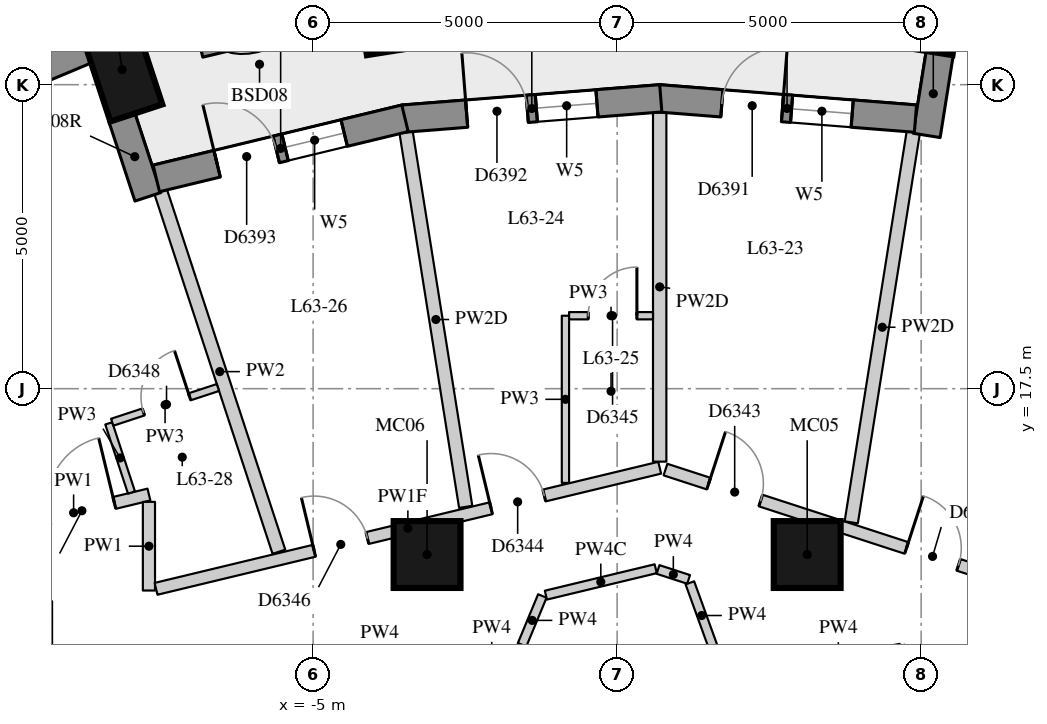
"""IFC4 building model, lengths in metres.
Left out: names, types, materials, properties, quantities, classifications, styles, units other than length and angle.
Written with IfcOpenShell. Run it as: python <this file> out.ifc"""

import sys

from ifc_helpers import new_model, si_unit, direction, frame, frame_2d, origin, origin_2d, place, context, subcontext, project, spatial, rectangle, extrude, element, fill, save


model = new_model("IFC4")
c1 = context("Model", 3, precision=1e-05, world=origin(), true_north=direction((0.0, 1.0)))
c2 = subcontext(c1, "Body", "Model", "MODEL_VIEW")
j1 = project(units=[si_unit("LENGTHUNIT", "METRE"), si_unit("PLANEANGLEUNIT", "RADIAN")], contexts=[c1])
p1 = place(None, origin())
s1 = spatial("IfcSite", under=j1, at=p1, CompositionType="ELEMENT")
p2 = place(p1, origin())
s2 = spatial("IfcBuilding", under=s1, at=p2, CompositionType="ELEMENT")
p3 = place(p2, frame((0.0, 0.0, 222.2)))
s3 = spatial("IfcBuildingStorey", under=s2, at=p3, CompositionType="ELEMENT", Elevation=222.2)
for number, where, z_axis, x_axis in (
    (1, (5.189, 23.797, 0.0), (0.0, 0.0, 1.0), (0.157, 0.988, 0.0)),
    (2, (-3.789, 23.797, 0.0), (0.0, 0.0, 1.0), (-0.157, 0.988, 0.0)),
    (3, (-8.141, 22.748, 0.0), (0.0, 0.0, 1.0), (-0.312, 0.95, 0.0)),
):
    element("IfcColumn", number, at=place(p3, frame(where, z_axis=z_axis, x_axis=x_axis)), inside=s3, PredefinedType="COLUMN", context=c2, shape_type="SweptSolid", body=[
        extrude(rectangle(XDim=1.5, YDim=0.9, at=origin_2d()), origin(), (0.0, 0.0, 1.0), 3.3),
    ])
for number, where, z_axis, x_axis in (
    (4, (3.126, 14.772, 0.0), (0.0, 0.0, 1.0), (1.0, 0.0, 0.0)),
    (5, (-3.126, 14.772, 0.0), (0.0, 0.0, 1.0), (1.0, 0.0, 0.0)),
):
    element("IfcColumn", number, at=place(p3, frame(where, z_axis=z_axis, x_axis=x_axis)), inside=s3, PredefinedType="COLUMN", context=c2, shape_type="SweptSolid", body=[
        extrude(rectangle(XDim=1.1, YDim=1.1, at=origin_2d()), origin(), (0.0, 0.0, 1.0), 3.3),
    ])
p4 = place(p3, frame((-8.703, 23.079, 0.0), z_axis=(0.0, 0.0, 1.0), x_axis=(-0.922168222612, -0.386789050006, 0.0)))
e6 = element("IfcWall", 6, at=p4, inside=s3, PredefinedType="SOLIDWALL", context=c2, shape_type="SweptSolid", body=[
    extrude(rectangle(XDim=3.651, YDim=0.45, at=frame_2d((1.825, 0.0))), origin(), (0.0, 0.0, 1.0), 3.02),
])
p5 = place(p4, frame((0.825, 0.0, 0.4)))
e7 = element("IfcOpeningElement", 7, at=p5, cuts=e6, PredefinedType="OPENING", context=c2, shape_type="SweptSolid", body=[
    extrude(rectangle(XDim=2.0, YDim=1.75, at=frame_2d((1.0, 0.875))), frame((0.0, 0.235, 0.0), z_axis=(0.0, -1.0, 0.0), x_axis=(1.0, 0.0, 0.0)), (0.0, 0.0, 1.0), 0.47),
])
p6 = place(p3, frame((5.309, 23.039, 0.0), z_axis=(0.0, 0.0, 1.0), x_axis=(-0.157189016474, -0.9875685359, 0.0)))
e8 = element("IfcWall", 8, at=p6, inside=s3, PredefinedType="SOLIDWALL", context=c2, shape_type="SweptSolid", body=[
    extrude(rectangle(XDim=1.39, YDim=0.45, at=frame_2d((0.695, 0.0))), origin(), (0.0, 0.0, 1.0), 2.47),
])
p7 = place(p3, frame((-8.15, 21.977, 0.0), z_axis=(0.0, 0.0, 1.0), x_axis=(0.312062715826, -0.950061504005, 0.0)))
e9 = element("IfcWall", 9, at=p7, inside=s3, PredefinedType="SOLIDWALL", context=c2, shape_type="SweptSolid", body=[
    extrude(rectangle(XDim=1.39, YDim=0.45, at=frame_2d((0.695, 0.0))), origin(), (0.0, 0.0, 1.0), 3.02),
])
p8 = place(p3, frame((4.906, 21.942, 0.0), z_axis=(0.0, 0.0, 1.0), x_axis=(-0.996902429846, 0.078648238166, 0.0)))
e10 = element("IfcWall", 10, at=p8, inside=s3, PredefinedType="SOLIDWALL", context=c2, shape_type="SweptSolid", body=[
    extrude(rectangle(XDim=4.237, YDim=0.45, at=frame_2d((2.119, 0.0))), origin(), (0.0, 0.0, 1.0), 3.02),
])
p9 = place(p8, frame((1.044, 0.0, 0.4)))
e11 = element("IfcOpeningElement", 11, at=p9, cuts=e10, PredefinedType="OPENING", context=c2, shape_type="SweptSolid", body=[
    extrude(rectangle(XDim=1.0, YDim=1.75, at=frame_2d((0.5, 0.875))), frame((0.0, 0.235, 0.0), z_axis=(0.0, -1.0, 0.0), x_axis=(1.0, 0.0, 0.0)), (0.0, 0.0, 1.0), 0.47),
])
p10 = place(p8, frame((2.194, 0.0, 0.0)))
e12 = element("IfcOpeningElement", 12, at=p10, cuts=e10, PredefinedType="OPENING", context=c2, shape_type="SweptSolid", body=[
    extrude(rectangle(XDim=1.0, YDim=2.15, at=frame_2d((0.5, 1.075))), frame((0.0, 0.235, 0.0), z_axis=(0.0, -1.0, 0.0), x_axis=(1.0, 0.0, 0.0)), (0.0, 0.0, 1.0), 0.47),
])
p11 = place(p3, frame((0.718, 22.276, 0.0), z_axis=(0.0, 0.0, 1.0), x_axis=(-0.996901346333, -0.078661970983, 0.0)))
e13 = element("IfcWall", 13, at=p11, inside=s3, PredefinedType="SOLIDWALL", context=c2, shape_type="SweptSolid", body=[
    extrude(rectangle(XDim=4.255, YDim=0.45, at=frame_2d((2.127, 0.0))), origin(), (0.0, 0.0, 1.0), 3.02),
])
p12 = place(p11, frame((1.052, 0.0, 0.4)))
e14 = element("IfcOpeningElement", 14, at=p12, cuts=e13, PredefinedType="OPENING", context=c2, shape_type="SweptSolid", body=[
    extrude(rectangle(XDim=1.0, YDim=1.75, at=frame_2d((0.5, 0.875))), frame((0.0, 0.235, 0.0), z_axis=(0.0, -1.0, 0.0), x_axis=(1.0, 0.0, 0.0)), (0.0, 0.0, 1.0), 0.47),
])
p13 = place(p11, frame((2.203, 0.0, 0.0)))
e15 = element("IfcOpeningElement", 15, at=p13, cuts=e13, PredefinedType="OPENING", context=c2, shape_type="SweptSolid", body=[
    extrude(rectangle(XDim=1.0, YDim=2.15, at=frame_2d((0.5, 1.075))), frame((0.0, 0.235, 0.0), z_axis=(0.0, -1.0, 0.0), x_axis=(1.0, 0.0, 0.0)), (0.0, 0.0, 1.0), 0.47),
])
p14 = place(p3, frame((-3.489, 21.947, 0.0), z_axis=(0.0, 0.0, 1.0), x_axis=(-0.972007311035, -0.234950606076, 0.0)))
e16 = element("IfcWall", 16, at=p14, inside=s3, PredefinedType="SOLIDWALL", context=c2, shape_type="SweptSolid", body=[
    extrude(rectangle(XDim=4.207, YDim=0.45, at=frame_2d((2.104, 0.0))), origin(), (0.0, 0.0, 1.0), 3.02),
])
p15 = place(p14, frame((1.029, 0.0, 0.4)))
e17 = element("IfcOpeningElement", 17, at=p15, cuts=e16, PredefinedType="OPENING", context=c2, shape_type="SweptSolid", body=[
    extrude(rectangle(XDim=1.0, YDim=1.75, at=frame_2d((0.5, 0.875))), frame((0.0, 0.235, 0.0), z_axis=(0.0, -1.0, 0.0), x_axis=(1.0, 0.0, 0.0)), (0.0, 0.0, 1.0), 0.47),
])
p16 = place(p14, frame((2.179, 0.0, 0.0)))
e18 = element("IfcOpeningElement", 18, at=p16, cuts=e16, PredefinedType="OPENING", context=c2, shape_type="SweptSolid", body=[
    extrude(rectangle(XDim=1.0, YDim=2.15, at=frame_2d((0.5, 1.075))), frame((0.0, 0.235, 0.0), z_axis=(0.0, -1.0, 0.0), x_axis=(1.0, 0.0, 0.0)), (0.0, 0.0, 1.0), 0.47),
])
p17 = place(p3, frame((-5.146, 23.714, 0.0), z_axis=(0.0, 0.0, 1.0), x_axis=(-0.972142986016, -0.234388597717, 0.0)))
e19 = element("IfcWall", 19, at=p17, inside=s3, PredefinedType="USERDEFINED", context=c2, shape_type="SweptSolid", body=[
    extrude(rectangle(XDim=1.8, YDim=0.7, at=frame_2d((0.9, 0.0))), origin(), (0.0, 0.0, 1.0), 0.75),
])
p18 = place(p3, frame((-10.177, 15.16, 0.0), z_axis=(0.0, 0.0, 1.0), x_axis=(0.971984190663, 0.235046236094, 0.0)))
e20 = element("IfcWall", 20, at=p18, inside=s3, PredefinedType="PARTITIONING", context=c2, shape_type="SweptSolid", body=[
    extrude(rectangle(XDim=2.549, YDim=0.2, at=frame_2d((1.274, 0.0))), origin(), (0.0, 0.0, 1.0), 3.02),
])
p19 = place(p18, frame((0.865, 0.0, 0.0)))
e21 = element("IfcOpeningElement", 21, at=p19, cuts=e20, PredefinedType="OPENING", context=c2, shape_type="SweptSolid", body=[
    extrude(rectangle(XDim=1.1, YDim=2.1, at=frame_2d((0.55, 1.05))), frame((0.0, 0.11, 0.0), z_axis=(0.0, -1.0, 0.0), x_axis=(1.0, 0.0, 0.0)), (0.0, 0.0, 1.0), 0.22),
])
p20 = place(p3, frame((-7.7, 15.639, 0.0), z_axis=(0.0, 0.0, 1.0), x_axis=(0.0, -1.0, 0.0)))
e22 = element("IfcWall", 22, at=p20, inside=s3, PredefinedType="PARTITIONING", context=c2, shape_type="SweptSolid", body=[
    extrude(rectangle(XDim=1.458, YDim=0.2, at=frame_2d((0.729, 0.0))), origin(), (0.0, 0.0, 1.0), 3.02),
])
p21 = place(p3, frame((-7.583, 14.208, 0.0), z_axis=(0.0, 0.0, 1.0), x_axis=(0.972284712223, 0.233799996531, 0.0)))
e23 = element("IfcWall", 23, at=p21, inside=s3, PredefinedType="PARTITIONING", context=c2, shape_type="SweptSolid", body=[
    extrude(rectangle(XDim=8.519, YDim=0.2, at=frame_2d((4.259, 0.0))), origin(), (0.0, 0.0, 1.0), 2.42),
])
p22 = place(p21, frame((5.667, 0.0, 0.0)))
e24 = element("IfcOpeningElement", 24, at=p22, cuts=e23, PredefinedType="OPENING", context=c2, shape_type="SweptSolid", body=[
    extrude(rectangle(XDim=0.9, YDim=2.1, at=frame_2d((0.45, 1.05))), frame((0.0, 0.11, 0.0), z_axis=(0.0, -1.0, 0.0), x_axis=(1.0, 0.0, 0.0)), (0.0, 0.0, 1.0), 0.22),
])
p23 = place(p21, frame((2.674, 0.0, 0.0)))
e25 = element("IfcOpeningElement", 25, at=p23, cuts=e23, PredefinedType="OPENING", context=c2, shape_type="SweptSolid", body=[
    extrude(rectangle(XDim=0.9, YDim=2.1, at=frame_2d((0.45, 1.05))), frame((0.0, 0.11, 0.0), z_axis=(0.0, -1.0, 0.0), x_axis=(1.0, 0.0, 0.0)), (0.0, 0.0, 1.0), 0.22),
])
p24 = place(p3, frame((0.795, 16.169, 0.0), z_axis=(0.0, 0.0, 1.0), x_axis=(0.950998491074, -0.309195520626, 0.0)))
e26 = element("IfcWall", 26, at=p24, inside=s3, PredefinedType="PARTITIONING", context=c2, shape_type="SweptSolid", body=[
    extrude(rectangle(XDim=12.357, YDim=0.2, at=frame_2d((6.179, 0.0))), origin(), (0.0, 0.0, 1.0), 3.02),
])
p25 = place(p24, frame((8.496, 0.0, 0.0)))
e27 = element("IfcOpeningElement", 27, at=p25, cuts=e26, PredefinedType="OPENING", context=c2, shape_type="SweptSolid", body=[
    extrude(rectangle(XDim=1.1, YDim=2.1, at=frame_2d((0.55, 1.05))), frame((0.0, 0.11, 0.0), z_axis=(0.0, -1.0, 0.0), x_axis=(1.0, 0.0, 0.0)), (0.0, 0.0, 1.0), 0.22),
])
p26 = place(p24, frame((4.169, 0.0, 0.0)))
e28 = element("IfcOpeningElement", 28, at=p26, cuts=e26, PredefinedType="OPENING", context=c2, shape_type="SweptSolid", body=[
    extrude(rectangle(XDim=0.9, YDim=2.1, at=frame_2d((0.45, 1.05))), frame((0.0, 0.11, 0.0), z_axis=(0.0, -1.0, 0.0), x_axis=(1.0, 0.0, 0.0)), (0.0, 0.0, 1.0), 0.22),
])
p27 = place(p24, frame((0.747, 0.0, 0.0)))
e29 = element("IfcOpeningElement", 29, at=p27, cuts=e26, PredefinedType="OPENING", context=c2, shape_type="SweptSolid", body=[
    extrude(rectangle(XDim=0.9, YDim=2.1, at=frame_2d((0.45, 1.05))), frame((0.0, 0.11, 0.0), z_axis=(0.0, -1.0, 0.0), x_axis=(1.0, 0.0, 0.0)), (0.0, 0.0, 1.0), 0.22),
])
p28 = place(p3, frame((-1.563, 13.288, 0.0), z_axis=(0.0, 0.0, 1.0), x_axis=(0.383038417634, 0.923732412886, 0.0)))
e30 = element("IfcWall", 30, at=p28, inside=s3, PredefinedType="PARTITIONING", context=c2, shape_type="SweptSolid", body=[
    extrude(rectangle(XDim=0.869, YDim=0.15, at=frame_2d((0.434, 0.0))), origin(), (0.0, 0.0, 1.0), 3.02),
])
p29 = place(p3, frame((-1.172, 14.104, 0.0), z_axis=(0.0, 0.0, 1.0), x_axis=(0.972260724841, 0.233899728371, 0.0)))
e31 = element("IfcWall", 31, at=p29, inside=s3, PredefinedType="PARTITIONING", context=c2, shape_type="SweptSolid", body=[
    extrude(rectangle(XDim=1.858, YDim=0.15, at=frame_2d((0.929, 0.0))), origin(), (0.0, 0.0, 1.0), 2.42),
])
p30 = place(p3, frame((0.673, 14.527, 0.0), z_axis=(0.0, 0.0, 1.0), x_axis=(0.950966196829, -0.309294831008, 0.0)))
e32 = element("IfcWall", 32, at=p30, inside=s3, PredefinedType="PARTITIONING", context=c2, shape_type="SweptSolid", body=[
    extrude(rectangle(XDim=0.529, YDim=0.15, at=frame_2d((0.264, 0.0))), origin(), (0.0, 0.0, 1.0), 3.02),
])
p31 = place(p3, frame((1.196, 14.307, 0.0), z_axis=(0.0, 0.0, 1.0), x_axis=(0.340730877952, -0.940160873899, 0.0)))
e33 = element("IfcWall", 33, at=p31, inside=s3, PredefinedType="PARTITIONING", context=c2, shape_type="SweptSolid", body=[
    extrude(rectangle(XDim=1.143, YDim=0.15, at=frame_2d((0.571, 0.0))), origin(), (0.0, 0.0, 1.0), 3.02),
])
p32 = place(p3, frame((4.871, 21.719, 0.0), z_axis=(0.0, 0.0, 1.0), x_axis=(-0.157114215968, -0.98758043882, 0.0)))
e34 = element("IfcWall", 34, at=p32, inside=s3, PredefinedType="PARTITIONING", context=c2, shape_type="SweptSolid", body=[
    extrude(rectangle(XDim=6.499, YDim=0.22, at=frame_2d((3.249, 0.0))), origin(), (0.0, 0.0, 1.0), 2.47),
])
p33 = place(p3, frame((0.7, 22.049, 0.0), z_axis=(0.0, 0.0, 1.0), x_axis=(0.0, -1.0, 0.0)))
e35 = element("IfcWall", 35, at=p33, inside=s3, PredefinedType="PARTITIONING", context=c2, shape_type="SweptSolid", body=[
    extrude(rectangle(XDim=5.749, YDim=0.22, at=frame_2d((2.874, 0.0))), origin(), (0.0, 0.0, 1.0), 2.47),
])
p34 = place(p3, frame((-3.471, 21.719, 0.0), z_axis=(0.0, 0.0, 1.0), x_axis=(0.157105510173, -0.987581823786, 0.0)))
e36 = element("IfcWall", 36, at=p34, inside=s3, PredefinedType="PARTITIONING", context=c2, shape_type="SweptSolid", body=[
    extrude(rectangle(XDim=6.241, YDim=0.22, at=frame_2d((3.12, 0.0))), origin(), (0.0, 0.0, 1.0), 2.47),
])
p35 = place(p3, frame((-7.508, 20.743, 0.0), z_axis=(0.0, 0.0, 1.0), x_axis=(0.311985211021, -0.95008695818, 0.0)))
e37 = element("IfcWall", 37, at=p35, inside=s3, PredefinedType="PARTITIONING", context=c2, shape_type="SweptSolid", body=[
    extrude(rectangle(XDim=6.237, YDim=0.22, at=frame_2d((3.118, 0.0))), origin(), (0.0, 0.0, 1.0), 3.02),
])
p36 = place(p3, frame((-0.85, 15.95, 0.0), z_axis=(0.0, 0.0, 1.0), x_axis=(0.0, 1.0, 0.0)))
e38 = element("IfcWall", 38, at=p36, inside=s3, PredefinedType="PARTITIONING", context=c2, shape_type="SweptSolid", body=[
    extrude(rectangle(XDim=2.75, YDim=0.12, at=frame_2d((1.375, 0.0))), origin(), (0.0, 0.0, 1.0), 3.02),
])
p37 = place(p3, frame((-7.987, 15.792, 0.0), z_axis=(0.0, 0.0, 1.0), x_axis=(-0.312187467963, 0.950020518119, 0.0)))
e39 = element("IfcWall", 39, at=p37, inside=s3, PredefinedType="PARTITIONING", context=c2, shape_type="SweptSolid", body=[
    extrude(rectangle(XDim=1.197, YDim=0.12, at=frame_2d((0.599, 0.0))), origin(), (0.0, 0.0, 1.0), 3.02),
])
p38 = place(p3, frame((-0.79, 18.7, 0.0), z_axis=(0.0, 0.0, 1.0), x_axis=(1.0, 0.0, 0.0)))
e40 = element("IfcWall", 40, at=p38, inside=s3, PredefinedType="PARTITIONING", context=c2, shape_type="SweptSolid", body=[
    extrude(rectangle(XDim=1.38, YDim=0.12, at=frame_2d((0.69, 0.0))), origin(), (0.0, 0.0, 1.0), 3.02),
])
p39 = place(p38, frame((0.315, 0.0, 0.0)))
e41 = element("IfcOpeningElement", 41, at=p39, cuts=e40, PredefinedType="OPENING", context=c2, shape_type="SweptSolid", body=[
    extrude(rectangle(XDim=0.8, YDim=2.1, at=frame_2d((0.4, 1.05))), frame((0.0, 0.07, 0.0), z_axis=(0.0, -1.0, 0.0), x_axis=(1.0, 0.0, 0.0)), (0.0, 0.0, 1.0), 0.14),
])
p40 = place(p3, frame((-8.304, 16.948, 0.0), z_axis=(0.0, 0.0, 1.0), x_axis=(0.95011423119, 0.311902144415, 0.0)))
e42 = element("IfcWall", 42, at=p40, inside=s3, PredefinedType="PARTITIONING", context=c2, shape_type="SweptSolid", body=[
    extrude(rectangle(XDim=1.83, YDim=0.12, at=frame_2d((0.915, 0.0))), origin(), (0.0, 0.0, 1.0), 3.02),
])
p41 = place(p40, frame((0.54, 0.0, 0.0)))
e43 = element("IfcOpeningElement", 43, at=p41, cuts=e42, PredefinedType="OPENING", context=c2, shape_type="SweptSolid", body=[
    extrude(rectangle(XDim=0.8, YDim=2.1, at=frame_2d((0.4, 1.05))), frame((0.0, 0.07, 0.0), z_axis=(0.0, -1.0, 0.0), x_axis=(1.0, 0.0, 0.0)), (0.0, 0.0, 1.0), 0.14),
])
p42 = place(p9, origin())
e44 = element("IfcWindow", 44, at=p42, inside=s3, PartitioningType="SINGLE_PANEL", PredefinedType="WINDOW", context=c2, shape_type="SweptSolid", body=[
    extrude(rectangle(XDim=1.0, YDim=1.75, at=frame_2d((0.5, 0.875))), frame((0.0, 0.035, 0.0), z_axis=(0.0, -1.0, 0.0), x_axis=(1.0, 0.0, 0.0)), (0.0, 0.0, 1.0), 0.06),
])
fill(e11, e44)
p43 = place(p10, frame((1.0, 0.0, 0.0), z_axis=(0.0, 0.0, 1.0), x_axis=(-1.0, 0.0, 0.0)))
e45 = element("IfcDoor", 45, at=p43, inside=s3, OperationType="SINGLE_SWING_RIGHT", PredefinedType="DOOR", context=c2, shape_type="SweptSolid", body=[
    extrude(rectangle(XDim=1.0, YDim=2.15, at=frame_2d((0.5, 1.075))), frame((0.0, 0.075, 0.0), z_axis=(0.0, -1.0, 0.0), x_axis=(1.0, 0.0, 0.0)), (0.0, 0.0, 1.0), 0.05),
])
fill(e12, e45)
p44 = place(p12, origin())
e46 = element("IfcWindow", 46, at=p44, inside=s3, PartitioningType="SINGLE_PANEL", PredefinedType="WINDOW", context=c2, shape_type="SweptSolid", body=[
    extrude(rectangle(XDim=1.0, YDim=1.75, at=frame_2d((0.5, 0.875))), frame((0.0, 0.035, 0.0), z_axis=(0.0, -1.0, 0.0), x_axis=(1.0, 0.0, 0.0)), (0.0, 0.0, 1.0), 0.06),
])
fill(e14, e46)
p45 = place(p13, frame((1.0, 0.0, 0.0), z_axis=(0.0, 0.0, 1.0), x_axis=(-1.0, 0.0, 0.0)))
e47 = element("IfcDoor", 47, at=p45, inside=s3, OperationType="SINGLE_SWING_LEFT", PredefinedType="DOOR", context=c2, shape_type="SweptSolid", body=[
    extrude(rectangle(XDim=1.0, YDim=2.15, at=frame_2d((0.5, 1.075))), frame((0.0, 0.075, 0.0), z_axis=(0.0, -1.0, 0.0), x_axis=(1.0, 0.0, 0.0)), (0.0, 0.0, 1.0), 0.05),
])
fill(e15, e47)
p46 = place(p15, origin())
e48 = element("IfcWindow", 48, at=p46, inside=s3, PartitioningType="SINGLE_PANEL", PredefinedType="WINDOW", context=c2, shape_type="SweptSolid", body=[
    extrude(rectangle(XDim=1.0, YDim=1.75, at=frame_2d((0.5, 0.875))), frame((0.0, 0.035, 0.0), z_axis=(0.0, -1.0, 0.0), x_axis=(1.0, 0.0, 0.0)), (0.0, 0.0, 1.0), 0.06),
])
fill(e17, e48)
p47 = place(p16, frame((1.0, 0.0, 0.0), z_axis=(0.0, 0.0, 1.0), x_axis=(-1.0, 0.0, 0.0)))
e49 = element("IfcDoor", 49, at=p47, inside=s3, OperationType="SINGLE_SWING_LEFT", PredefinedType="DOOR", context=c2, shape_type="SweptSolid", body=[
    extrude(rectangle(XDim=1.0, YDim=2.15, at=frame_2d((0.5, 1.075))), frame((0.0, 0.075, 0.0), z_axis=(0.0, -1.0, 0.0), x_axis=(1.0, 0.0, 0.0)), (0.0, 0.0, 1.0), 0.05),
])
fill(e18, e49)
p48 = place(p26, origin())
e50 = element("IfcDoor", 50, at=p48, inside=s3, OperationType="SINGLE_SWING_LEFT", PredefinedType="DOOR", context=c2, shape_type="SweptSolid", body=[
    extrude(rectangle(XDim=0.9, YDim=2.1, at=frame_2d((0.45, 1.05))), frame((0.0, 0.025, 0.0), z_axis=(0.0, -1.0, 0.0), x_axis=(1.0, 0.0, 0.0)), (0.0, 0.0, 1.0), 0.05),
])
fill(e28, e50)
p49 = place(p27, origin())
e51 = element("IfcDoor", 51, at=p49, inside=s3, OperationType="SINGLE_SWING_LEFT", PredefinedType="DOOR", context=c2, shape_type="SweptSolid", body=[
    extrude(rectangle(XDim=0.9, YDim=2.1, at=frame_2d((0.45, 1.05))), frame((0.0, 0.025, 0.0), z_axis=(0.0, -1.0, 0.0), x_axis=(1.0, 0.0, 0.0)), (0.0, 0.0, 1.0), 0.05),
])
fill(e29, e51)
p50 = place(p22, origin())
e52 = element("IfcDoor", 52, at=p50, inside=s3, OperationType="SINGLE_SWING_LEFT", PredefinedType="DOOR", context=c2, shape_type="SweptSolid", body=[
    extrude(rectangle(XDim=0.9, YDim=2.1, at=frame_2d((0.45, 1.05))), frame((0.0, 0.025, 0.0), z_axis=(0.0, -1.0, 0.0), x_axis=(1.0, 0.0, 0.0)), (0.0, 0.0, 1.0), 0.05),
])
fill(e24, e52)
p51 = place(p39, origin())
e53 = element("IfcDoor", 53, at=p51, inside=s3, OperationType="SINGLE_SWING_RIGHT", PredefinedType="DOOR", context=c2, shape_type="SweptSolid", body=[
    extrude(rectangle(XDim=0.8, YDim=2.1, at=frame_2d((0.4, 1.05))), frame((0.0, 0.025, 0.0), z_axis=(0.0, -1.0, 0.0), x_axis=(1.0, 0.0, 0.0)), (0.0, 0.0, 1.0), 0.05),
])
fill(e41, e53)
p52 = place(p23, origin())
e54 = element("IfcDoor", 54, at=p52, inside=s3, OperationType="SINGLE_SWING_LEFT", PredefinedType="DOOR", context=c2, shape_type="SweptSolid", body=[
    extrude(rectangle(XDim=0.9, YDim=2.1, at=frame_2d((0.45, 1.05))), frame((0.0, 0.025, 0.0), z_axis=(0.0, -1.0, 0.0), x_axis=(1.0, 0.0, 0.0)), (0.0, 0.0, 1.0), 0.05),
])
fill(e25, e54)
p53 = place(p19, origin())
e55 = element("IfcDoor", 55, at=p53, inside=s3, OperationType="SINGLE_SWING_RIGHT", PredefinedType="DOOR", context=c2, shape_type="SweptSolid", body=[
    extrude(rectangle(XDim=1.1, YDim=2.1, at=frame_2d((0.55, 1.05))), frame((0.0, 0.025, 0.0), z_axis=(0.0, -1.0, 0.0), x_axis=(1.0, 0.0, 0.0)), (0.0, 0.0, 1.0), 0.05),
])
fill(e21, e55)
p54 = place(p41, origin())
e56 = element("IfcDoor", 56, at=p54, inside=s3, OperationType="SINGLE_SWING_RIGHT", PredefinedType="DOOR", context=c2, shape_type="SweptSolid", body=[
    extrude(rectangle(XDim=0.8, YDim=2.1, at=frame_2d((0.4, 1.05))), frame((0.0, 0.025, 0.0), z_axis=(0.0, -1.0, 0.0), x_axis=(1.0, 0.0, 0.0)), (0.0, 0.0, 1.0), 0.05),
])
fill(e43, e56)
save(model, sys.argv[1])
